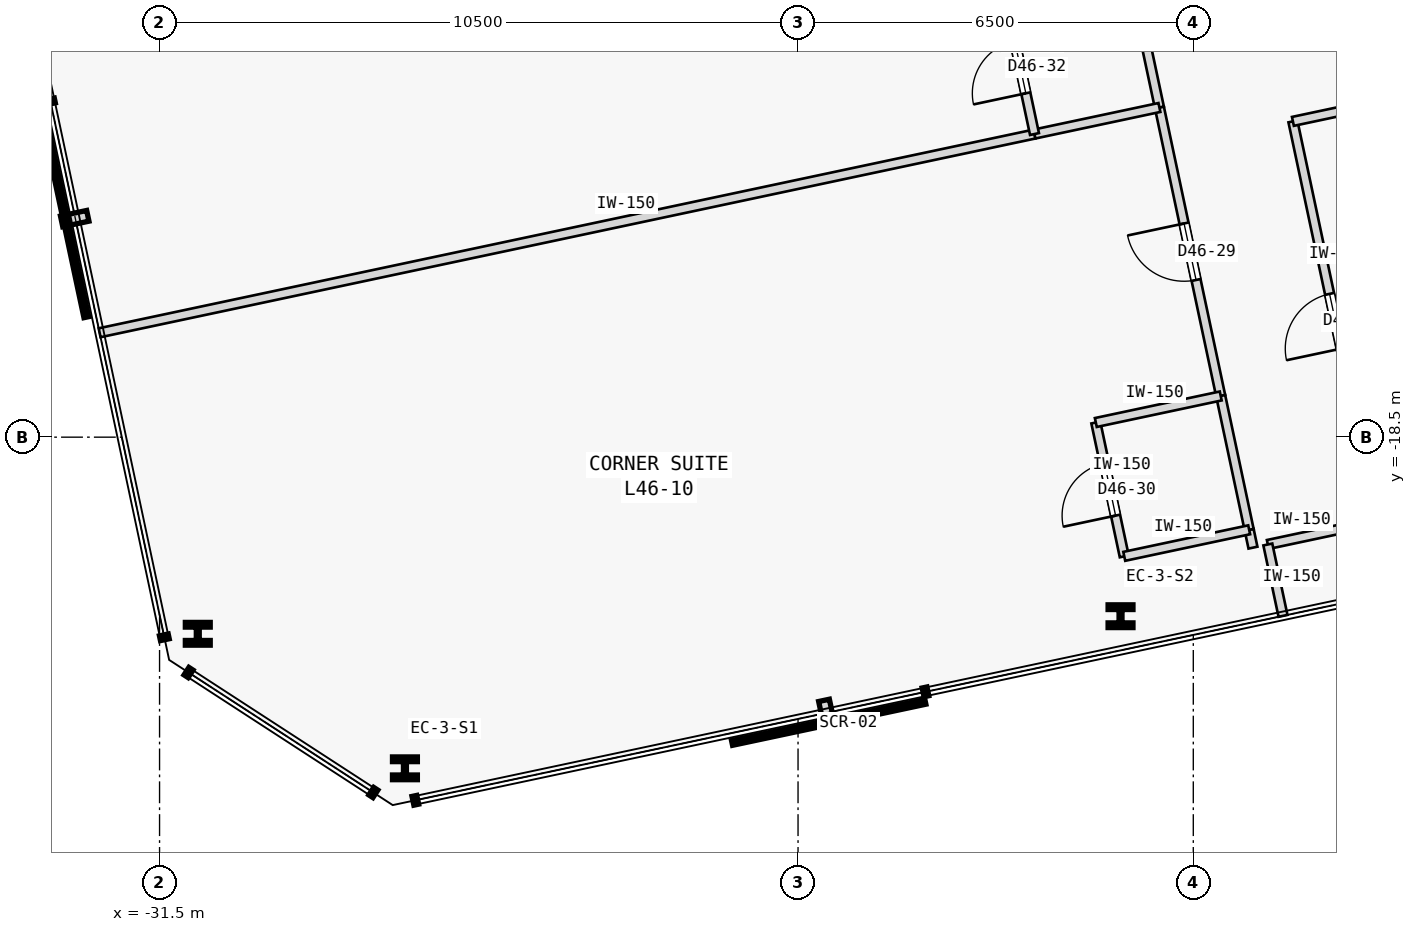
"""IFC4 building model, lengths in metres.
Left out: names, types, materials, properties, quantities, classifications, styles, units other than length and angle.
Written with IfcOpenShell. Run it as: python <this file> out.ifc"""

import sys

from ifc_helpers import new_model, si_unit, direction, frame, frame_2d, origin, origin_2d, place, context, subcontext, project, spatial, rectangle, i_section, extrude, element, fill, save


model = new_model("IFC4")
c1 = context("Model", 3, precision=1e-05, world=origin(), true_north=direction((0.0, 1.0)))
c2 = subcontext(c1, "Body", "Model", "MODEL_VIEW")
j1 = project(units=[si_unit("LENGTHUNIT", "METRE"), si_unit("PLANEANGLEUNIT", "RADIAN")], contexts=[c1])
p1 = place(None, origin())
s1 = spatial("IfcSite", under=j1, at=p1, CompositionType="ELEMENT")
p2 = place(p1, origin())
s2 = spatial("IfcBuilding", under=s1, at=p2, CompositionType="ELEMENT")
p3 = place(p2, frame((0.0, 0.0, 178.6)))
s3 = spatial("IfcBuildingStorey", under=s2, at=p3, CompositionType="ELEMENT", Elevation=178.6)
for number, where, z_axis, x_axis in (
    (1, (-27.465, -23.946, 0.0), (0.0, 0.0, 1.0), (1.0, 0.0, 0.0)),
    (2, (-15.697, -21.444, 0.0), (0.0, 0.0, 1.0), (1.0, 0.0, 0.0)),
    (3, (-30.871, -21.733, 0.0), (0.0, 0.0, 1.0), (1.0, 0.0, 0.0)),
):
    element("IfcColumn", number, at=place(p3, frame(where, z_axis=z_axis, x_axis=x_axis)), inside=s3, PredefinedType="COLUMN", context=c2, shape_type="SweptSolid", body=[
        extrude(i_section(OverallWidth=0.409, OverallDepth=0.374, WebThickness=0.048, FlangeThickness=0.077, FilletRadius=0.015, at=origin_2d()), origin(), (0.0, 0.0, 1.0), 3.4),
    ])
p4 = place(p3, frame((-13.274, -20.265, 0.0), z_axis=(0.0, 0.0, 1.0), x_axis=(0.978160192495, 0.207852442415, 0.0)))
e4 = element("IfcWall", 4, at=p4, inside=s3, PredefinedType="PARTITIONING", context=c2, shape_type="SweptSolid", body=[
    extrude(rectangle(XDim=1.85, YDim=0.15, at=frame_2d((0.925, 0.0))), origin(), (0.0, 0.0, 1.0), 3.175),
])
p5 = place(p3, frame((-11.465, -19.88, 0.0), z_axis=(0.0, 0.0, 1.0), x_axis=(-0.207916109912, 0.978146661416, 0.0)))
e5 = element("IfcWall", 5, at=p5, inside=s3, PredefinedType="PARTITIONING", context=c2, shape_type="SweptSolid", body=[
    extrude(rectangle(XDim=6.72, YDim=0.15, at=frame_2d((3.36, 0.0))), origin(), (0.0, 0.0, 1.0), 3.175),
])
p6 = place(p5, frame((2.9, 0.0, 0.0)))
e6 = element("IfcOpeningElement", 6, at=p6, cuts=e5, PredefinedType="OPENING", context=c2, shape_type="SweptSolid", body=[
    extrude(rectangle(XDim=0.92, YDim=2.15, at=frame_2d((0.46, 1.075))), frame((0.0, 0.085, 0.0), z_axis=(0.0, -1.0, 0.0), x_axis=(1.0, 0.0, 0.0)), (0.0, 0.0, 1.0), 0.17),
])
p7 = place(p3, frame((-12.862, -13.307, 0.0), z_axis=(0.0, 0.0, 1.0), x_axis=(0.978145647498, 0.207920879857, 0.0)))
e7 = element("IfcWall", 7, at=p7, inside=s3, PredefinedType="PARTITIONING", context=c2, shape_type="SweptSolid", body=[
    extrude(rectangle(XDim=5.029, YDim=0.15, at=frame_2d((2.515, 0.0))), origin(), (0.0, 0.0, 1.0), 3.175),
])
p8 = place(p3, frame((-13.519, -20.317, 0.0), z_axis=(0.0, 0.0, 1.0), x_axis=(-0.207527808066, 0.978229118806, 0.0)))
e8 = element("IfcWall", 8, at=p8, inside=s3, PredefinedType="PARTITIONING", context=c2, shape_type="SweptSolid", body=[
    extrude(rectangle(XDim=0.3, YDim=0.15, at=frame_2d((0.15, 0.0))), origin(), (0.0, 0.0, 1.0), 3.175),
])
p9 = place(p3, frame((-14.049, -17.823, 0.0), z_axis=(0.0, 0.0, 1.0), x_axis=(-0.2079027059, 0.978149510494, 0.0)))
e9 = element("IfcWall", 9, at=p9, inside=s3, PredefinedType="PARTITIONING", context=c2, shape_type="SweptSolid", body=[
    extrude(rectangle(XDim=4.85, YDim=0.15, at=frame_2d((2.425, 0.0))), origin(), (0.0, 0.0, 1.0), 3.175),
])
p10 = place(p9, frame((1.95, 0.0, 0.0)))
e10 = element("IfcOpeningElement", 10, at=p10, cuts=e9, PredefinedType="OPENING", context=c2, shape_type="SweptSolid", body=[
    extrude(rectangle(XDim=0.95, YDim=2.15, at=frame_2d((0.475, 1.075))), frame((0.0, 0.085, 0.0), z_axis=(0.0, -1.0, 0.0), x_axis=(1.0, 0.0, 0.0)), (0.0, 0.0, 1.0), 0.17),
])
p11 = place(p3, frame((-13.581, -20.023, 0.0), z_axis=(0.0, 0.0, 1.0), x_axis=(-0.207891197838, 0.978151956427, 0.0)))
e11 = element("IfcWall", 11, at=p11, inside=s3, PredefinedType="PARTITIONING", context=c2, shape_type="SweptSolid", body=[
    extrude(rectangle(XDim=2.25, YDim=0.15, at=frame_2d((1.125, 0.0))), origin(), (0.0, 0.0, 1.0), 3.175),
])
p12 = place(p3, frame((-15.057, -13.079, 0.0), z_axis=(0.0, 0.0, 1.0), x_axis=(-0.207995007687, 0.978129887478, 0.0)))
e12 = element("IfcWall", 12, at=p12, inside=s3, PredefinedType="PARTITIONING", context=c2, shape_type="SweptSolid", body=[
    extrude(rectangle(XDim=2.25, YDim=0.15, at=frame_2d((1.125, 0.0))), origin(), (0.0, 0.0, 1.0), 3.175),
])
p13 = place(p3, frame((-13.025, -21.439, 0.0), z_axis=(0.0, 0.0, 1.0), x_axis=(-0.207917150959, 0.978146440129, 0.0)))
e13 = element("IfcWall", 13, at=p13, inside=s3, PredefinedType="PARTITIONING", context=c2, shape_type="SweptSolid", body=[
    extrude(rectangle(XDim=1.2, YDim=0.15, at=frame_2d((0.6, 0.0))), origin(), (0.0, 0.0, 1.0), 3.175),
])
p14 = place(p3, frame((-15.635, -20.46, 0.0), z_axis=(0.0, 0.0, 1.0), x_axis=(-0.207913264065, 0.978147266328, 0.0)))
e14 = element("IfcWall", 14, at=p14, inside=s3, PredefinedType="PARTITIONING", context=c2, shape_type="SweptSolid", body=[
    extrude(rectangle(XDim=2.25, YDim=0.15, at=frame_2d((1.125, 0.0))), origin(), (0.0, 0.0, 1.0), 3.175),
])
p15 = place(p14, frame((0.685, 0.0, 0.0)))
e15 = element("IfcOpeningElement", 15, at=p15, cuts=e14, PredefinedType="OPENING", context=c2, shape_type="SweptSolid", body=[
    extrude(rectangle(XDim=0.88, YDim=2.15, at=frame_2d((0.44, 1.075))), frame((0.0, 0.085, 0.0), z_axis=(0.0, -1.0, 0.0), x_axis=(1.0, 0.0, 0.0)), (0.0, 0.0, 1.0), 0.17),
])
for number, where, z_axis, x_axis in (
    (16, (-15.635, -20.46, 0.0), (0.0, 0.0, 1.0), (0.978, 0.208, 0.0)),
    (17, (-16.103, -18.259, 0.0), (0.0, 0.0, 1.0), (0.978, 0.208, 0.0)),
):
    element("IfcWall", number, at=place(p3, frame(where, z_axis=z_axis, x_axis=x_axis)), inside=s3, PredefinedType="PARTITIONING", context=c2, shape_type="SweptSolid", body=[
        extrude(rectangle(XDim=2.1, YDim=0.15, at=frame_2d((1.05, 0.0))), origin(), (0.0, 0.0, 1.0), 3.175),
    ])
p16 = place(p3, frame((-32.486, -16.783, 0.0), z_axis=(0.0, 0.0, 1.0), x_axis=(0.978146137903, 0.207918572776, 0.0)))
e18 = element("IfcWall", 18, at=p16, inside=s3, PredefinedType="PARTITIONING", context=c2, shape_type="SweptSolid", body=[
    extrude(rectangle(XDim=15.718, YDim=0.15, at=frame_2d((7.859, 0.0))), origin(), (0.0, 0.0, 1.0), 3.175),
])
p17 = place(p3, frame((-17.111, -13.515, 0.0), z_axis=(0.0, 0.0, 1.0), x_axis=(0.97815826, 0.207861536591, 0.0)))
e19 = element("IfcWall", 19, at=p17, inside=s3, PredefinedType="PARTITIONING", context=c2, shape_type="SweptSolid", body=[
    extrude(rectangle(XDim=2.1, YDim=0.15, at=frame_2d((1.05, 0.0))), origin(), (0.0, 0.0, 1.0), 3.175),
])
p18 = place(p3, frame((-17.111, -13.515, 0.0), z_axis=(0.0, 0.0, 1.0), x_axis=(-0.207913264065, 0.978147266328, 0.0)))
e20 = element("IfcWall", 20, at=p18, inside=s3, PredefinedType="PARTITIONING", context=c2, shape_type="SweptSolid", body=[
    extrude(rectangle(XDim=2.25, YDim=0.15, at=frame_2d((1.125, 0.0))), origin(), (0.0, 0.0, 1.0), 3.175),
])
p19 = place(p18, frame((0.685, 0.0, 0.0)))
e21 = element("IfcOpeningElement", 21, at=p19, cuts=e20, PredefinedType="OPENING", context=c2, shape_type="SweptSolid", body=[
    extrude(rectangle(XDim=0.88, YDim=2.15, at=frame_2d((0.44, 1.075))), frame((0.0, 0.085, 0.0), z_axis=(0.0, -1.0, 0.0), x_axis=(1.0, 0.0, 0.0)), (0.0, 0.0, 1.0), 0.17),
])
p20 = place(p6, origin())
e22 = element("IfcDoor", 22, at=p20, inside=s3, OperationType="SINGLE_SWING_LEFT", PredefinedType="DOOR", context=c2, shape_type="SweptSolid", body=[
    extrude(rectangle(XDim=0.92, YDim=2.15, at=frame_2d((0.46, 1.075))), frame((0.0, 0.025, 0.0), z_axis=(0.0, -1.0, 0.0), x_axis=(1.0, 0.0, 0.0)), (0.0, 0.0, 1.0), 0.05),
])
fill(e6, e22)
p21 = place(p10, origin())
e23 = element("IfcDoor", 23, at=p21, inside=s3, OperationType="SINGLE_SWING_RIGHT", PredefinedType="DOOR", context=c2, shape_type="SweptSolid", body=[
    extrude(rectangle(XDim=0.95, YDim=2.15, at=frame_2d((0.475, 1.075))), frame((0.0, 0.025, 0.0), z_axis=(0.0, -1.0, 0.0), x_axis=(1.0, 0.0, 0.0)), (0.0, 0.0, 1.0), 0.05),
])
fill(e10, e23)
p22 = place(p15, origin())
e24 = element("IfcDoor", 24, at=p22, inside=s3, OperationType="SINGLE_SWING_LEFT", PredefinedType="DOOR", context=c2, shape_type="SweptSolid", body=[
    extrude(rectangle(XDim=0.88, YDim=2.15, at=frame_2d((0.44, 1.075))), frame((0.0, 0.025, 0.0), z_axis=(0.0, -1.0, 0.0), x_axis=(1.0, 0.0, 0.0)), (0.0, 0.0, 1.0), 0.05),
])
fill(e15, e24)
p23 = place(p19, origin())
e25 = element("IfcDoor", 25, at=p23, inside=s3, OperationType="SINGLE_SWING_LEFT", PredefinedType="DOOR", context=c2, shape_type="SweptSolid", body=[
    extrude(rectangle(XDim=0.88, YDim=2.15, at=frame_2d((0.44, 1.075))), frame((0.0, 0.025, 0.0), z_axis=(0.0, -1.0, 0.0), x_axis=(1.0, 0.0, 0.0)), (0.0, 0.0, 1.0), 0.05),
])
fill(e21, e25)
save(model, sys.argv[1])
